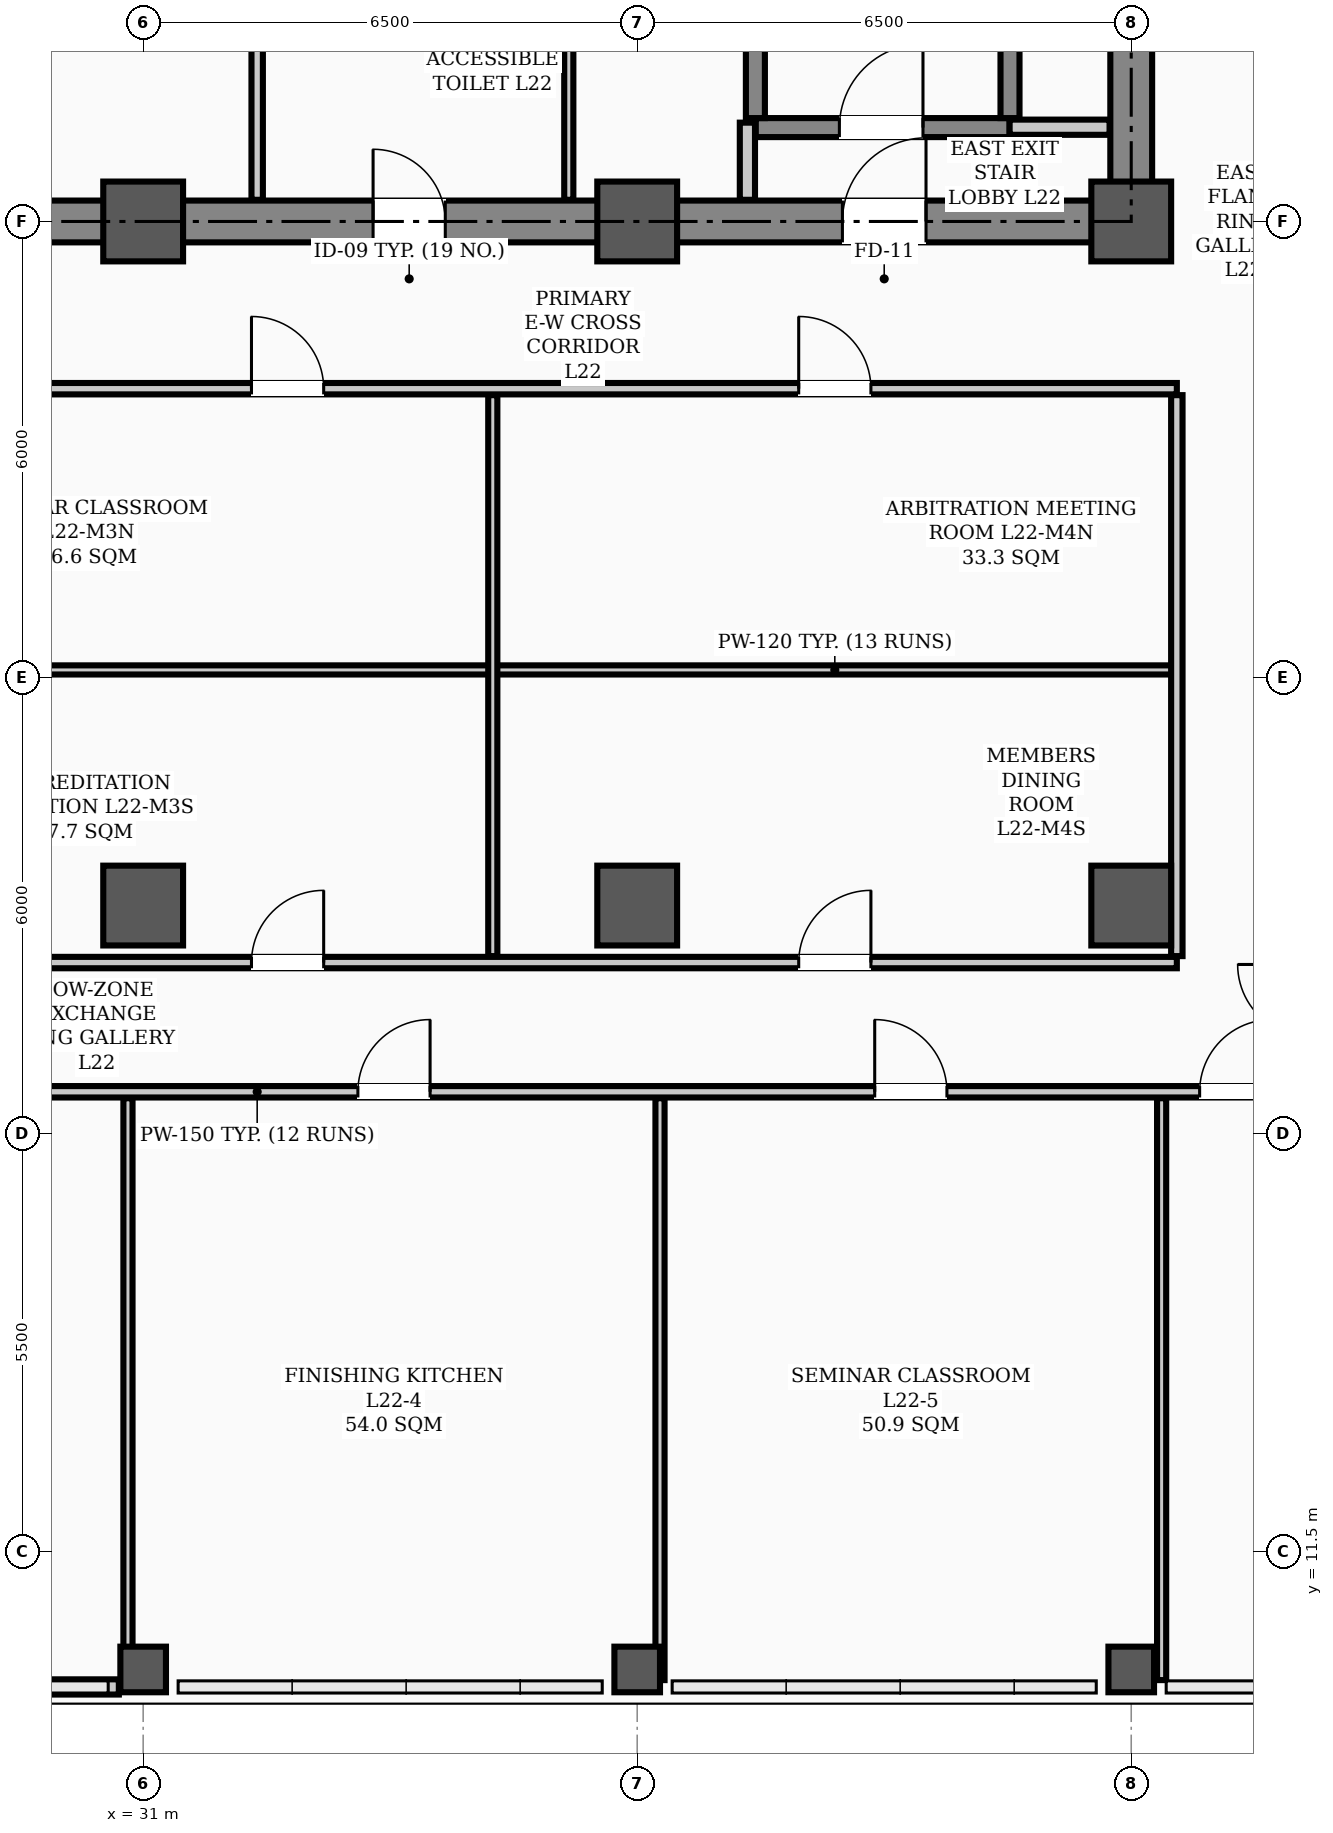
"""IFC4 building model, lengths in metres.
Left out: names, types, materials, properties, quantities, classifications, styles, units other than length and angle.
Written with IfcOpenShell. Run it as: python <this file> out.ifc"""

import sys

from ifc_helpers import new_model, si_unit, direction, frame, frame_2d, origin, origin_2d, place, context, subcontext, project, spatial, rectangle, hollow_rectangle, extrude, element, fill, save


model = new_model("IFC4")
c1 = context("Model", 3, precision=1e-05, world=origin(), true_north=direction((0.0, 1.0)))
c2 = subcontext(c1, "Body", "Model", "MODEL_VIEW")
j1 = project(units=[si_unit("LENGTHUNIT", "METRE"), si_unit("PLANEANGLEUNIT", "RADIAN")], contexts=[c1])
p1 = place(None, origin())
s1 = spatial("IfcSite", under=j1, at=p1, CompositionType="ELEMENT")
p2 = place(p1, origin())
s2 = spatial("IfcBuilding", under=s1, at=p2, CompositionType="ELEMENT")
p3 = place(p2, frame((0.0, 0.0, 88.9)))
s3 = spatial("IfcBuildingStorey", under=s2, at=p3, CompositionType="ELEMENT", Elevation=88.9)
for number, where, z_axis, x_axis in (
    (1, (31.0, 29.0, 0.0), (0.0, 0.0, 1.0), (1.0, 0.0, 0.0)),
    (2, (37.5, 29.0, 0.0), (0.0, 0.0, 1.0), (1.0, 0.0, 0.0)),
    (3, (44.0, 29.0, 0.0), (0.0, 0.0, 1.0), (1.0, 0.0, 0.0)),
    (4, (31.0, 20.0, 0.0), (0.0, 0.0, 1.0), (1.0, 0.0, 0.0)),
    (5, (37.5, 20.0, 0.0), (0.0, 0.0, 1.0), (1.0, 0.0, 0.0)),
    (6, (44.0, 20.0, 0.0), (0.0, 0.0, 1.0), (1.0, 0.0, 0.0)),
):
    element("IfcColumn", number, at=place(p3, frame(where, z_axis=z_axis, x_axis=x_axis)), inside=s3, PredefinedType="COLUMN", context=c2, shape_type="SweptSolid", body=[
        extrude(hollow_rectangle(XDim=1.05, YDim=1.05, WallThickness=0.038, InnerFilletRadius=0.019, OuterFilletRadius=0.057, at=origin_2d()), origin(), (0.0, 0.0, 1.0), 3.9),
    ])
for number, where, z_axis, x_axis in (
    (7, (31.0, 9.95, 0.0), (0.0, 0.0, 1.0), (1.0, 0.0, 0.0)),
    (8, (37.5, 9.95, 0.0), (0.0, 0.0, 1.0), (1.0, 0.0, 0.0)),
    (9, (44.0, 9.95, 0.0), (0.0, 0.0, 1.0), (1.0, 0.0, 0.0)),
):
    element("IfcColumn", number, at=place(p3, frame(where, z_axis=z_axis, x_axis=x_axis)), inside=s3, PredefinedType="COLUMN", context=c2, shape_type="SweptSolid", body=[
        extrude(hollow_rectangle(XDim=0.6, YDim=0.6, WallThickness=0.026, InnerFilletRadius=0.013, OuterFilletRadius=0.039, at=origin_2d()), origin(), (0.0, 0.0, 1.0), 3.9),
    ])
p4 = place(p3, frame((29.35, 9.72, 0.0), z_axis=(0.0, 0.0, 1.0), x_axis=(1.0, 0.0, 0.0)))
e10 = element("IfcWall", 10, at=p4, inside=s3, PredefinedType="PARAPET", context=c2, shape_type="SweptSolid", body=[
    extrude(rectangle(XDim=1.33, YDim=0.2, at=frame_2d((0.665, 0.0))), origin(), (0.0, 0.0, 1.0), 1.2),
])
p5 = place(p3, frame((13.5, 29.0, 0.0), z_axis=(0.0, 0.0, 1.0), x_axis=(1.0, 0.0, 0.0)))
e11 = element("IfcWall", 11, at=p5, inside=s3, PredefinedType="SHEAR", context=c2, shape_type="SweptSolid", body=[
    extrude(rectangle(XDim=30.5, YDim=0.55, at=frame_2d((15.25, 0.0))), origin(), (0.0, 0.0, 1.0), 3.72),
])
p6 = place(p5, frame((1.75, 0.0, 0.0)))
e12 = element("IfcOpeningElement", 12, at=p6, cuts=e11, PredefinedType="OPENING", context=c2, shape_type="SweptSolid", body=[
    extrude(rectangle(XDim=1.1, YDim=2.08, at=frame_2d((0.55, 1.04))), frame((0.0, 0.285, 0.0), z_axis=(0.0, -1.0, 0.0), x_axis=(1.0, 0.0, 0.0)), (0.0, 0.0, 1.0), 0.57),
])
p7 = place(p5, frame((26.7, 0.0, 0.0)))
e13 = element("IfcOpeningElement", 13, at=p7, cuts=e11, PredefinedType="OPENING", context=c2, shape_type="SweptSolid", body=[
    extrude(rectangle(XDim=1.1, YDim=2.08, at=frame_2d((0.55, 1.04))), frame((0.0, 0.285, 0.0), z_axis=(0.0, -1.0, 0.0), x_axis=(1.0, 0.0, 0.0)), (0.0, 0.0, 1.0), 0.57),
])
p8 = place(p5, frame((6.8, 0.0, 0.0)))
e14 = element("IfcOpeningElement", 14, at=p8, cuts=e11, PredefinedType="OPENING", context=c2, shape_type="SweptSolid", body=[
    extrude(rectangle(XDim=1.1, YDim=2.08, at=frame_2d((0.55, 1.04))), frame((0.0, 0.285, 0.0), z_axis=(0.0, -1.0, 0.0), x_axis=(1.0, 0.0, 0.0)), (0.0, 0.0, 1.0), 0.57),
])
p9 = place(p5, frame((13.2, 0.0, 0.0)))
e15 = element("IfcOpeningElement", 15, at=p9, cuts=e11, PredefinedType="OPENING", context=c2, shape_type="SweptSolid", body=[
    extrude(rectangle(XDim=1.6, YDim=2.08, at=frame_2d((0.8, 1.04))), frame((0.0, 0.285, 0.0), z_axis=(0.0, -1.0, 0.0), x_axis=(1.0, 0.0, 0.0)), (0.0, 0.0, 1.0), 0.57),
])
p10 = place(p5, frame((20.525, 0.0, 0.0)))
e16 = element("IfcOpeningElement", 16, at=p10, cuts=e11, PredefinedType="OPENING", context=c2, shape_type="SweptSolid", body=[
    extrude(rectangle(XDim=0.95, YDim=2.08, at=frame_2d((0.475, 1.04))), frame((0.0, 0.285, 0.0), z_axis=(0.0, -1.0, 0.0), x_axis=(1.0, 0.0, 0.0)), (0.0, 0.0, 1.0), 0.57),
])
p11 = place(p3, frame((44.0, 29.35, 0.0), z_axis=(0.0, 0.0, 1.0), x_axis=(0.0, 1.0, 0.0)))
e17 = element("IfcWall", 17, at=p11, inside=s3, PredefinedType="SHEAR", context=c2, shape_type="SweptSolid", body=[
    extrude(rectangle(XDim=8.6, YDim=0.55, at=frame_2d((4.3, 0.0))), origin(), (0.0, 0.0, 1.0), 3.72),
])
p12 = place(p3, frame((39.06, 30.235, 0.0), z_axis=(0.0, 0.0, 1.0), x_axis=(1.0, 0.0, 0.0)))
e18 = element("IfcWall", 18, at=p12, inside=s3, PredefinedType="STANDARD", context=c2, shape_type="SweptSolid", body=[
    extrude(rectangle(XDim=3.34, YDim=0.25, at=frame_2d((1.67, 0.0))), origin(), (0.0, 0.0, 1.0), 3.72),
])
p13 = place(p12, frame((1.1, 0.0, 0.0)))
e19 = element("IfcOpeningElement", 19, at=p13, cuts=e18, PredefinedType="OPENING", context=c2, shape_type="SweptSolid", body=[
    extrude(rectangle(XDim=1.1, YDim=2.08, at=frame_2d((0.55, 1.04))), frame((0.0, 0.135, 0.0), z_axis=(0.0, -1.0, 0.0), x_axis=(1.0, 0.0, 0.0)), (0.0, 0.0, 1.0), 0.27),
])
for number, where, z_axis, x_axis in (
    (20, (39.055, 30.36, 0.0), (0.0, 0.0, 1.0), (0.0, 1.0, 0.0)),
    (21, (42.405, 30.36, 0.0), (0.0, 0.0, 1.0), (0.0, 1.0, 0.0)),
):
    element("IfcWall", number, at=place(p3, frame(where, z_axis=z_axis, x_axis=x_axis)), inside=s3, PredefinedType="STANDARD", context=c2, shape_type="SweptSolid", body=[
        extrude(rectangle(XDim=7.184, YDim=0.25, at=frame_2d((3.592, 0.0))), origin(), (0.0, 0.0, 1.0), 3.72),
    ])
p14 = place(p3, frame((42.4, 30.24, 0.0), z_axis=(0.0, 0.0, 1.0), x_axis=(1.0, 0.0, 0.0)))
e22 = element("IfcWall", 22, at=p14, inside=s3, PredefinedType="STANDARD", context=c2, shape_type="SweptSolid", body=[
    extrude(rectangle(XDim=1.315, YDim=0.2, at=frame_2d((0.658, 0.0))), origin(), (0.0, 0.0, 1.0), 3.1),
])
p15 = place(p3, frame((12.9, 26.8, 0.0), z_axis=(0.0, 0.0, 1.0), x_axis=(1.0, 0.0, 0.0)))
e23 = element("IfcWall", 23, at=p15, inside=s3, PredefinedType="PARTITIONING", context=c2, shape_type="SweptSolid", body=[
    extrude(rectangle(XDim=31.7, YDim=0.15, at=frame_2d((15.85, 0.0))), origin(), (0.0, 0.0, 1.0), 3.1),
])
p16 = place(p15, frame((13.6, 0.0, 0.0)))
e24 = element("IfcOpeningElement", 24, at=p16, cuts=e23, PredefinedType="OPENING", context=c2, shape_type="SweptSolid", body=[
    extrude(rectangle(XDim=1.6, YDim=2.08, at=frame_2d((0.8, 1.04))), frame((0.0, 0.085, 0.0), z_axis=(0.0, -1.0, 0.0), x_axis=(1.0, 0.0, 0.0)), (0.0, 0.0, 1.0), 0.17),
])
p17 = place(p15, frame((3.275, 0.0, 0.0)))
e25 = element("IfcOpeningElement", 25, at=p17, cuts=e23, PredefinedType="OPENING", context=c2, shape_type="SweptSolid", body=[
    extrude(rectangle(XDim=0.95, YDim=2.08, at=frame_2d((0.475, 1.04))), frame((0.0, 0.085, 0.0), z_axis=(0.0, -1.0, 0.0), x_axis=(1.0, 0.0, 0.0)), (0.0, 0.0, 1.0), 0.17),
])
p18 = place(p15, frame((9.025, 0.0, 0.0)))
e26 = element("IfcOpeningElement", 26, at=p18, cuts=e23, PredefinedType="OPENING", context=c2, shape_type="SweptSolid", body=[
    extrude(rectangle(XDim=0.95, YDim=2.08, at=frame_2d((0.475, 1.04))), frame((0.0, 0.085, 0.0), z_axis=(0.0, -1.0, 0.0), x_axis=(1.0, 0.0, 0.0)), (0.0, 0.0, 1.0), 0.17),
])
p19 = place(p15, frame((19.525, 0.0, 0.0)))
e27 = element("IfcOpeningElement", 27, at=p19, cuts=e23, PredefinedType="OPENING", context=c2, shape_type="SweptSolid", body=[
    extrude(rectangle(XDim=0.95, YDim=2.08, at=frame_2d((0.475, 1.04))), frame((0.0, 0.085, 0.0), z_axis=(0.0, -1.0, 0.0), x_axis=(1.0, 0.0, 0.0)), (0.0, 0.0, 1.0), 0.17),
])
p20 = place(p15, frame((26.725, 0.0, 0.0)))
e28 = element("IfcOpeningElement", 28, at=p20, cuts=e23, PredefinedType="OPENING", context=c2, shape_type="SweptSolid", body=[
    extrude(rectangle(XDim=0.95, YDim=2.08, at=frame_2d((0.475, 1.04))), frame((0.0, 0.085, 0.0), z_axis=(0.0, -1.0, 0.0), x_axis=(1.0, 0.0, 0.0)), (0.0, 0.0, 1.0), 0.17),
])
p21 = place(p3, frame((7.81, 17.55, 0.0), z_axis=(0.0, 0.0, 1.0), x_axis=(1.0, 0.0, 0.0)))
e29 = element("IfcWall", 29, at=p21, inside=s3, PredefinedType="PARTITIONING", context=c2, shape_type="SweptSolid", body=[
    extrude(rectangle(XDim=49.38, YDim=0.15, at=frame_2d((24.69, 0.0))), origin(), (0.0, 0.0, 1.0), 3.1),
])
p22 = place(p21, frame((7.465, 0.0, 0.0)))
e30 = element("IfcOpeningElement", 30, at=p22, cuts=e29, PredefinedType="OPENING", context=c2, shape_type="SweptSolid", body=[
    extrude(rectangle(XDim=0.95, YDim=2.08, at=frame_2d((0.475, 1.04))), frame((0.0, 0.085, 0.0), z_axis=(0.0, -1.0, 0.0), x_axis=(1.0, 0.0, 0.0)), (0.0, 0.0, 1.0), 0.17),
])
p23 = place(p21, frame((11.915, 0.0, 0.0)))
e31 = element("IfcOpeningElement", 31, at=p23, cuts=e29, PredefinedType="OPENING", context=c2, shape_type="SweptSolid", body=[
    extrude(rectangle(XDim=0.95, YDim=2.08, at=frame_2d((0.475, 1.04))), frame((0.0, 0.085, 0.0), z_axis=(0.0, -1.0, 0.0), x_axis=(1.0, 0.0, 0.0)), (0.0, 0.0, 1.0), 0.17),
])
p24 = place(p21, frame((18.915, 0.0, 0.0)))
e32 = element("IfcOpeningElement", 32, at=p24, cuts=e29, PredefinedType="OPENING", context=c2, shape_type="SweptSolid", body=[
    extrude(rectangle(XDim=0.95, YDim=2.08, at=frame_2d((0.475, 1.04))), frame((0.0, 0.085, 0.0), z_axis=(0.0, -1.0, 0.0), x_axis=(1.0, 0.0, 0.0)), (0.0, 0.0, 1.0), 0.17),
])
p25 = place(p21, frame((26.015, 0.0, 0.0)))
e33 = element("IfcOpeningElement", 33, at=p25, cuts=e29, PredefinedType="OPENING", context=c2, shape_type="SweptSolid", body=[
    extrude(rectangle(XDim=0.95, YDim=2.08, at=frame_2d((0.475, 1.04))), frame((0.0, 0.085, 0.0), z_axis=(0.0, -1.0, 0.0), x_axis=(1.0, 0.0, 0.0)), (0.0, 0.0, 1.0), 0.17),
])
p26 = place(p21, frame((32.815, 0.0, 0.0)))
e34 = element("IfcOpeningElement", 34, at=p26, cuts=e29, PredefinedType="OPENING", context=c2, shape_type="SweptSolid", body=[
    extrude(rectangle(XDim=0.95, YDim=2.08, at=frame_2d((0.475, 1.04))), frame((0.0, 0.085, 0.0), z_axis=(0.0, -1.0, 0.0), x_axis=(1.0, 0.0, 0.0)), (0.0, 0.0, 1.0), 0.17),
])
p27 = place(p21, frame((37.09, 0.0, 0.0)))
e35 = element("IfcOpeningElement", 35, at=p27, cuts=e29, PredefinedType="OPENING", context=c2, shape_type="SweptSolid", body=[
    extrude(rectangle(XDim=0.95, YDim=2.08, at=frame_2d((0.475, 1.04))), frame((0.0, 0.085, 0.0), z_axis=(0.0, -1.0, 0.0), x_axis=(1.0, 0.0, 0.0)), (0.0, 0.0, 1.0), 0.17),
])
p28 = place(p3, frame((28.4, 19.25, 0.0), z_axis=(0.0, 0.0, 1.0), x_axis=(1.0, 0.0, 0.0)))
e36 = element("IfcWall", 36, at=p28, inside=s3, PredefinedType="PARTITIONING", context=c2, shape_type="SweptSolid", body=[
    extrude(rectangle(XDim=16.2, YDim=0.15, at=frame_2d((8.1, 0.0))), origin(), (0.0, 0.0, 1.0), 3.1),
])
p29 = place(p28, frame((4.025, 0.0, 0.0)))
e37 = element("IfcOpeningElement", 37, at=p29, cuts=e36, PredefinedType="OPENING", context=c2, shape_type="SweptSolid", body=[
    extrude(rectangle(XDim=0.95, YDim=2.08, at=frame_2d((0.475, 1.04))), frame((0.0, 0.085, 0.0), z_axis=(0.0, -1.0, 0.0), x_axis=(1.0, 0.0, 0.0)), (0.0, 0.0, 1.0), 0.17),
])
p30 = place(p28, frame((11.225, 0.0, 0.0)))
e38 = element("IfcOpeningElement", 38, at=p30, cuts=e36, PredefinedType="OPENING", context=c2, shape_type="SweptSolid", body=[
    extrude(rectangle(XDim=0.95, YDim=2.08, at=frame_2d((0.475, 1.04))), frame((0.0, 0.085, 0.0), z_axis=(0.0, -1.0, 0.0), x_axis=(1.0, 0.0, 0.0)), (0.0, 0.0, 1.0), 0.17),
])
p31 = place(p3, frame((28.4, 23.1, 0.0), z_axis=(0.0, 0.0, 1.0), x_axis=(1.0, 0.0, 0.0)))
e39 = element("IfcWall", 39, at=p31, inside=s3, PredefinedType="PARTITIONING", context=c2, shape_type="SweptSolid", body=[
    extrude(rectangle(XDim=7.2, YDim=0.12, at=frame_2d((3.6, 0.0))), origin(), (0.0, 0.0, 1.0), 3.1),
])
p32 = place(p3, frame((35.6, 23.1, 0.0), z_axis=(0.0, 0.0, 1.0), x_axis=(1.0, 0.0, 0.0)))
e40 = element("IfcWall", 40, at=p32, inside=s3, PredefinedType="PARTITIONING", context=c2, shape_type="SweptSolid", body=[
    extrude(rectangle(XDim=9.0, YDim=0.12, at=frame_2d((4.5, 0.0))), origin(), (0.0, 0.0, 1.0), 3.1),
])
p33 = place(p3, frame((38.95, 29.285, 0.0), z_axis=(0.0, 0.0, 1.0), x_axis=(0.0, 1.0, 0.0)))
e41 = element("IfcWall", 41, at=p33, inside=s3, PredefinedType="STANDARD", context=c2, shape_type="SweptSolid", body=[
    extrude(rectangle(XDim=1.015, YDim=0.2, at=frame_2d((0.508, 0.0))), origin(), (0.0, 0.0, 1.0), 3.3),
])
p34 = place(p3, frame((32.5, 29.285, 0.0), z_axis=(0.0, 0.0, 1.0), x_axis=(0.0, 1.0, 0.0)))
e42 = element("IfcWall", 42, at=p34, inside=s3, PredefinedType="PARTITIONING", context=c2, shape_type="SweptSolid", body=[
    extrude(rectangle(XDim=2.48, YDim=0.15, at=frame_2d((1.24, 0.0))), origin(), (0.0, 0.0, 1.0), 3.3),
])
p35 = place(p3, frame((36.6, 29.285, 0.0), z_axis=(0.0, 0.0, 1.0), x_axis=(0.0, 1.0, 0.0)))
e43 = element("IfcWall", 43, at=p35, inside=s3, PredefinedType="PARTITIONING", context=c2, shape_type="SweptSolid", body=[
    extrude(rectangle(XDim=2.48, YDim=0.12, at=frame_2d((1.24, 0.0))), origin(), (0.0, 0.0, 1.0), 3.3),
])
p36 = place(p3, frame((44.6, 19.335, 0.0), z_axis=(0.0, 0.0, 1.0), x_axis=(0.0, 1.0, 0.0)))
e44 = element("IfcWall", 44, at=p36, inside=s3, PredefinedType="PARTITIONING", context=c2, shape_type="SweptSolid", body=[
    extrude(rectangle(XDim=7.38, YDim=0.15, at=frame_2d((3.69, 0.0))), origin(), (0.0, 0.0, 1.0), 3.0),
])
for number, where, z_axis, x_axis in (
    (45, (30.8, 9.81, 0.0), (0.0, 0.0, 1.0), (0.0, 1.0, 0.0)),
    (46, (37.8, 9.81, 0.0), (0.0, 0.0, 1.0), (0.0, 1.0, 0.0)),
    (47, (44.4, 9.81, 0.0), (0.0, 0.0, 1.0), (0.0, 1.0, 0.0)),
):
    element("IfcWall", number, at=place(p3, frame(where, z_axis=z_axis, x_axis=x_axis)), inside=s3, PredefinedType="PARTITIONING", context=c2, shape_type="SweptSolid", body=[
        extrude(rectangle(XDim=7.655, YDim=0.12, at=frame_2d((3.828, 0.0))), origin(), (0.0, 0.0, 1.0), 3.1),
    ])
p37 = place(p3, frame((35.6, 19.335, 0.0), z_axis=(0.0, 0.0, 1.0), x_axis=(0.0, 1.0, 0.0)))
e48 = element("IfcWall", 48, at=p37, inside=s3, PredefinedType="PARTITIONING", context=c2, shape_type="SweptSolid", body=[
    extrude(rectangle(XDim=7.38, YDim=0.12, at=frame_2d((3.69, 0.0))), origin(), (0.0, 0.0, 1.0), 3.0),
])
p38 = place(p13, origin())
e49 = element("IfcDoor", 49, at=p38, inside=s3, OperationType="SINGLE_SWING_RIGHT", PredefinedType="DOOR", context=c2, shape_type="SweptSolid", body=[
    extrude(rectangle(XDim=1.1, YDim=2.08, at=frame_2d((0.55, 1.04))), frame((0.0, 0.025, 0.0), z_axis=(0.0, -1.0, 0.0), x_axis=(1.0, 0.0, 0.0)), (0.0, 0.0, 1.0), 0.05),
])
fill(e19, e49)
p39 = place(p7, origin())
e50 = element("IfcDoor", 50, at=p39, inside=s3, OperationType="SINGLE_SWING_RIGHT", PredefinedType="DOOR", context=c2, shape_type="SweptSolid", body=[
    extrude(rectangle(XDim=1.1, YDim=2.08, at=frame_2d((0.55, 1.04))), frame((0.0, 0.025, 0.0), z_axis=(0.0, -1.0, 0.0), x_axis=(1.0, 0.0, 0.0)), (0.0, 0.0, 1.0), 0.05),
])
fill(e13, e50)
p40 = place(p10, origin())
e51 = element("IfcDoor", 51, at=p40, inside=s3, OperationType="SINGLE_SWING_LEFT", PredefinedType="DOOR", context=c2, shape_type="SweptSolid", body=[
    extrude(rectangle(XDim=0.95, YDim=2.08, at=frame_2d((0.475, 1.04))), frame((0.0, 0.025, 0.0), z_axis=(0.0, -1.0, 0.0), x_axis=(1.0, 0.0, 0.0)), (0.0, 0.0, 1.0), 0.05),
])
fill(e16, e51)
p41 = place(p25, origin())
e52 = element("IfcDoor", 52, at=p41, inside=s3, OperationType="SINGLE_SWING_RIGHT", PredefinedType="DOOR", context=c2, shape_type="SweptSolid", body=[
    extrude(rectangle(XDim=0.95, YDim=2.08, at=frame_2d((0.475, 1.04))), frame((0.0, 0.025, 0.0), z_axis=(0.0, -1.0, 0.0), x_axis=(1.0, 0.0, 0.0)), (0.0, 0.0, 1.0), 0.05),
])
fill(e33, e52)
p42 = place(p26, origin())
e53 = element("IfcDoor", 53, at=p42, inside=s3, OperationType="SINGLE_SWING_LEFT", PredefinedType="DOOR", context=c2, shape_type="SweptSolid", body=[
    extrude(rectangle(XDim=0.95, YDim=2.08, at=frame_2d((0.475, 1.04))), frame((0.0, 0.025, 0.0), z_axis=(0.0, -1.0, 0.0), x_axis=(1.0, 0.0, 0.0)), (0.0, 0.0, 1.0), 0.05),
])
fill(e34, e53)
p43 = place(p27, origin())
e54 = element("IfcDoor", 54, at=p43, inside=s3, OperationType="SINGLE_SWING_RIGHT", PredefinedType="DOOR", context=c2, shape_type="SweptSolid", body=[
    extrude(rectangle(XDim=0.95, YDim=2.08, at=frame_2d((0.475, 1.04))), frame((0.0, 0.025, 0.0), z_axis=(0.0, -1.0, 0.0), x_axis=(1.0, 0.0, 0.0)), (0.0, 0.0, 1.0), 0.05),
])
fill(e35, e54)
p44 = place(p19, origin())
e55 = element("IfcDoor", 55, at=p44, inside=s3, OperationType="SINGLE_SWING_LEFT", PredefinedType="DOOR", context=c2, shape_type="SweptSolid", body=[
    extrude(rectangle(XDim=0.95, YDim=2.08, at=frame_2d((0.475, 1.04))), frame((0.0, 0.025, 0.0), z_axis=(0.0, -1.0, 0.0), x_axis=(1.0, 0.0, 0.0)), (0.0, 0.0, 1.0), 0.05),
])
fill(e27, e55)
p45 = place(p29, origin())
e56 = element("IfcDoor", 56, at=p45, inside=s3, OperationType="SINGLE_SWING_RIGHT", PredefinedType="DOOR", context=c2, shape_type="SweptSolid", body=[
    extrude(rectangle(XDim=0.95, YDim=2.08, at=frame_2d((0.475, 1.04))), frame((0.0, 0.025, 0.0), z_axis=(0.0, -1.0, 0.0), x_axis=(1.0, 0.0, 0.0)), (0.0, 0.0, 1.0), 0.05),
])
fill(e37, e56)
p46 = place(p20, origin())
e57 = element("IfcDoor", 57, at=p46, inside=s3, OperationType="SINGLE_SWING_LEFT", PredefinedType="DOOR", context=c2, shape_type="SweptSolid", body=[
    extrude(rectangle(XDim=0.95, YDim=2.08, at=frame_2d((0.475, 1.04))), frame((0.0, 0.025, 0.0), z_axis=(0.0, -1.0, 0.0), x_axis=(1.0, 0.0, 0.0)), (0.0, 0.0, 1.0), 0.05),
])
fill(e28, e57)
p47 = place(p30, origin())
e58 = element("IfcDoor", 58, at=p47, inside=s3, OperationType="SINGLE_SWING_RIGHT", PredefinedType="DOOR", context=c2, shape_type="SweptSolid", body=[
    extrude(rectangle(XDim=0.95, YDim=2.08, at=frame_2d((0.475, 1.04))), frame((0.0, 0.025, 0.0), z_axis=(0.0, -1.0, 0.0), x_axis=(1.0, 0.0, 0.0)), (0.0, 0.0, 1.0), 0.05),
])
fill(e38, e58)
save(model, sys.argv[1])
